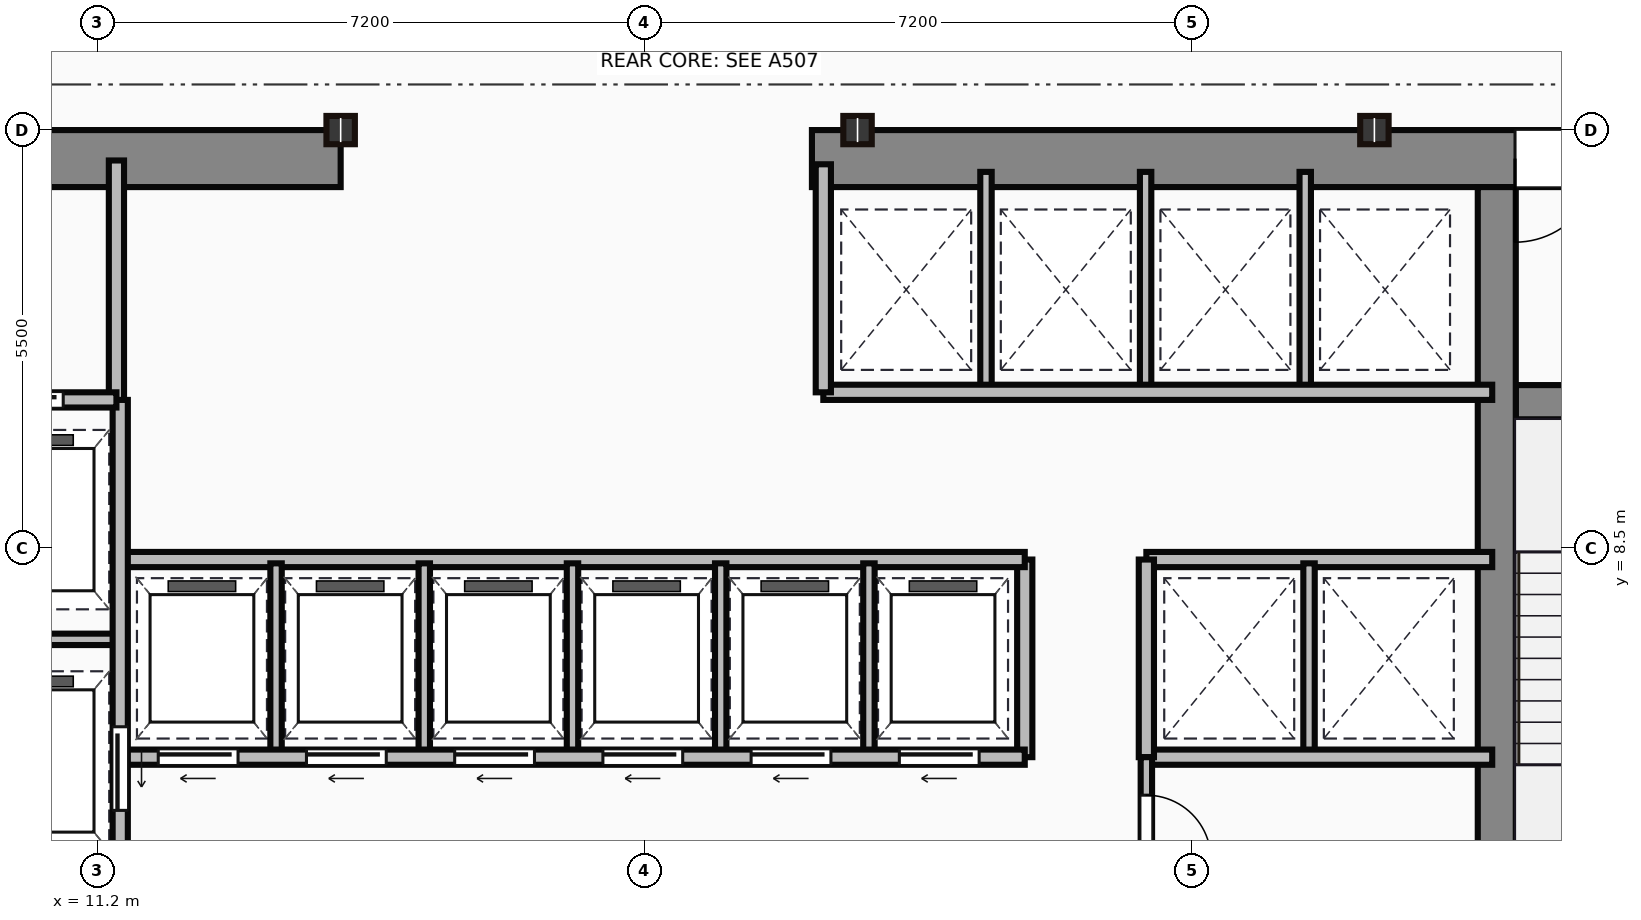
"""IFC4 building model, lengths in metres.
Left out: names, types, materials, properties, quantities, classifications, styles, units other than length and angle.
Written with IfcOpenShell. Run it as: python <this file> out.ifc"""

import sys

from ifc_helpers import new_model, si_unit, direction, frame, frame_2d, origin, origin_2d, place, context, subcontext, project, spatial, rectangle, i_section, extrude, source, transform, mapped, element, fill, save


model = new_model("IFC4")
c1 = context("Model", 3, precision=1e-05, world=origin(), true_north=direction((0.0, 1.0)))
c2 = subcontext(c1, "Body", "Model", "MODEL_VIEW")
j1 = project(units=[si_unit("LENGTHUNIT", "METRE"), si_unit("PLANEANGLEUNIT", "RADIAN")], contexts=[c1])
p1 = place(None, origin())
s1 = spatial("IfcSite", under=j1, at=p1, CompositionType="ELEMENT")
p2 = place(p1, origin())
s2 = spatial("IfcBuilding", under=s1, at=p2, CompositionType="ELEMENT")
p3 = place(p2, frame((0.0, 0.0, 151.55)))
s3 = spatial("IfcBuildingStorey", under=s2, at=p3, CompositionType="ELEMENT", Elevation=151.55)
m1 = source(origin(), c2, "Body", "SweptSolid", [
    extrude(rectangle(XDim=9.1, YDim=0.75, at=frame_2d((4.55, 0.0))), origin(), (0.0, 0.0, 1.0), 3.65),
])
p4 = place(p3, frame((5.3, 13.625, 0.0), z_axis=(0.0, 0.0, 1.0), x_axis=(1.0, 0.0, 0.0)))
e1 = element("IfcWall", 1, at=p4, inside=s3, PredefinedType="SHEAR", context=c2, shape_type="MappedRepresentation", body=[
    mapped(m1, transform((0.0, 0.0, 0.0))),
])
p5 = place(p4, frame((4.1, 0.0, 0.0)))
e2 = element("IfcOpeningElement", 2, at=p5, cuts=e1, PredefinedType="OPENING", context=c2, shape_type="SweptSolid", body=[
    extrude(rectangle(XDim=1.1, YDim=2.15, at=frame_2d((0.55, 1.075))), frame((0.0, 0.385, 0.0), z_axis=(0.0, -1.0, 0.0), x_axis=(1.0, 0.0, 0.0)), (0.0, 0.0, 1.0), 0.77),
])
m2 = source(origin(), c2, "Body", "SweptSolid", [
    extrude(rectangle(XDim=12.6, YDim=0.75, at=frame_2d((6.3, 0.0))), origin(), (0.0, 0.0, 1.0), 3.65),
])
p6 = place(p3, frame((20.6, 13.625, 0.0), z_axis=(0.0, 0.0, 1.0), x_axis=(1.0, 0.0, 0.0)))
e3 = element("IfcWall", 3, at=p6, inside=s3, PredefinedType="SHEAR", context=c2, shape_type="MappedRepresentation", body=[
    mapped(m2, transform((0.0, 0.0, 0.0))),
])
p7 = place(p6, frame((9.25, 0.0, 0.0)))
e4 = element("IfcOpeningElement", 4, at=p7, cuts=e3, PredefinedType="OPENING", context=c2, shape_type="SweptSolid", body=[
    extrude(rectangle(XDim=1.1, YDim=2.15, at=frame_2d((0.55, 1.075))), frame((0.0, 0.385, 0.0), z_axis=(0.0, -1.0, 0.0), x_axis=(1.0, 0.0, 0.0)), (0.0, 0.0, 1.0), 0.77),
])
m3 = source(origin(), c2, "Body", "SweptSolid", [
    extrude(rectangle(XDim=12.35, YDim=0.5, at=frame_2d((6.175, 0.0))), origin(), (0.0, 0.0, 1.0), 3.65),
])
p8 = place(p3, frame((29.61, 0.9, 0.0), z_axis=(0.0, 0.0, 1.0), x_axis=(0.0, 1.0, 0.0)))
e5 = element("IfcWall", 5, at=p8, inside=s3, PredefinedType="SHEAR", context=c2, shape_type="MappedRepresentation", body=[
    mapped(m3, transform((0.0, 0.0, 0.0))),
])
m4 = source(origin(), c2, "Body", "SweptSolid", [
    extrude(rectangle(XDim=3.39, YDim=0.45, at=frame_2d((1.695, 0.0))), origin(), (0.0, 0.0, 1.0), 3.65),
])
p9 = place(p3, frame((29.86, 10.42, 0.0), z_axis=(0.0, 0.0, 1.0), x_axis=(1.0, 0.0, 0.0)))
e6 = element("IfcWall", 6, at=p9, inside=s3, PredefinedType="SHEAR", context=c2, shape_type="MappedRepresentation", body=[
    mapped(m4, transform((0.0, 0.0, 0.0))),
])
p10 = place(p9, frame((1.1, 0.0, 0.0)))
e7 = element("IfcOpeningElement", 7, at=p10, cuts=e6, PredefinedType="OPENING", context=c2, shape_type="SweptSolid", body=[
    extrude(rectangle(XDim=1.1, YDim=2.15, at=frame_2d((0.55, 1.075))), frame((0.0, 0.235, 0.0), z_axis=(0.0, -1.0, 0.0), x_axis=(1.0, 0.0, 0.0)), (0.0, 0.0, 1.0), 0.47),
])
m5 = source(origin(), c2, "Body", "SweptSolid", [
    extrude(i_section(OverallWidth=0.374, OverallDepth=0.372, WebThickness=0.016, FlangeThickness=0.026, at=origin_2d()), origin(), (0.0, 0.0, 1.0), 3.65),
])
for number, where, z_axis, x_axis in (
    (8, (14.4, 14.0, 0.0), (0.0, 0.0, 1.0), (1.0, 0.0, 0.0)),
    (9, (21.2, 14.0, 0.0), (0.0, 0.0, 1.0), (1.0, 0.0, 0.0)),
    (10, (28.0, 14.0, 0.0), (0.0, 0.0, 1.0), (1.0, 0.0, 0.0)),
):
    element("IfcColumn", number, at=place(p3, frame(where, z_axis=z_axis, x_axis=x_axis)), inside=s3, PredefinedType="COLUMN", context=c2, shape_type="MappedRepresentation", body=[
        mapped(m5, transform((0.0, 0.0, 0.0))),
    ])
m6 = source(origin(), c2, "Body", "SweptSolid", [
    extrude(rectangle(XDim=3.18, YDim=0.2, at=frame_2d((1.59, 0.0))), origin(), (0.0, 0.0, 1.0), 3.4),
])
p11 = place(p3, frame((11.45, 10.42, 0.0), z_axis=(0.0, 0.0, 1.0), x_axis=(0.0, 1.0, 0.0)))
e11 = element("IfcWall", 11, at=p11, inside=s3, PredefinedType="PARTITIONING", context=c2, shape_type="MappedRepresentation", body=[
    mapped(m6, transform((0.0, 0.0, 0.0))),
])
m7 = source(origin(), c2, "Body", "SweptSolid", [
    extrude(rectangle(XDim=2.35, YDim=0.2, at=frame_2d((1.175, 0.0))), origin(), (0.0, 0.0, 1.0), 3.4),
])
p12 = place(p3, frame((9.1, 10.45, 0.0), z_axis=(0.0, 0.0, 1.0), x_axis=(1.0, 0.0, 0.0)))
e12 = element("IfcWall", 12, at=p12, inside=s3, PredefinedType="PARTITIONING", context=c2, shape_type="MappedRepresentation", body=[
    mapped(m7, transform((0.0, 0.0, 0.0))),
])
p13 = place(p12, frame((0.55, 0.0, 0.0)))
e13 = element("IfcOpeningElement", 13, at=p13, cuts=e12, PredefinedType="OPENING", context=c2, shape_type="SweptSolid", body=[
    extrude(rectangle(XDim=1.1, YDim=2.15, at=frame_2d((0.55, 1.075))), frame((0.0, 0.11, 0.0), z_axis=(0.0, -1.0, 0.0), x_axis=(1.0, 0.0, 0.0)), (0.0, 0.0, 1.0), 0.22),
])
m8 = source(origin(), c2, "Body", "SweptSolid", [
    extrude(rectangle(XDim=9.6, YDim=0.2, at=frame_2d((4.8, 0.0))), origin(), (0.0, 0.0, 1.0), 3.4),
])
p14 = place(p3, frame((11.5, 0.85, 0.0), z_axis=(0.0, 0.0, 1.0), x_axis=(0.0, 1.0, 0.0)))
e14 = element("IfcWall", 14, at=p14, inside=s3, PredefinedType="PARTITIONING", context=c2, shape_type="MappedRepresentation", body=[
    mapped(m8, transform((0.0, 0.0, 0.0))),
])
p15 = place(p14, frame((4.2, 0.0, 0.0)))
e15 = element("IfcOpeningElement", 15, at=p15, cuts=e14, PredefinedType="OPENING", context=c2, shape_type="SweptSolid", body=[
    extrude(rectangle(XDim=1.1, YDim=2.15, at=frame_2d((0.55, 1.075))), frame((0.0, 0.11, 0.0), z_axis=(0.0, -1.0, 0.0), x_axis=(1.0, 0.0, 0.0)), (0.0, 0.0, 1.0), 0.22),
])
p16 = place(p14, frame((0.9, 0.0, 0.0)))
e16 = element("IfcOpeningElement", 16, at=p16, cuts=e14, PredefinedType="OPENING", context=c2, shape_type="SweptSolid", body=[
    extrude(rectangle(XDim=1.2, YDim=2.15, at=frame_2d((0.6, 1.075))), frame((0.0, 0.11, 0.0), z_axis=(0.0, -1.0, 0.0), x_axis=(1.0, 0.0, 0.0)), (0.0, 0.0, 1.0), 0.22),
])
m9 = source(origin(), c2, "Body", "SweptSolid", [
    extrude(rectangle(XDim=2.4, YDim=0.15, at=frame_2d((1.2, 0.0))), origin(), (0.0, 0.0, 1.0), 3.4),
])
p17 = place(p3, frame((9.1, 7.3, 0.0), z_axis=(0.0, 0.0, 1.0), x_axis=(1.0, 0.0, 0.0)))
e17 = element("IfcWall", 17, at=p17, inside=s3, PredefinedType="PARTITIONING", context=c2, shape_type="MappedRepresentation", body=[
    mapped(m9, transform((0.0, 0.0, 0.0))),
])
m10 = source(origin(), c2, "Body", "SweptSolid", [
    extrude(rectangle(XDim=11.85, YDim=0.2, at=frame_2d((5.925, 0.0))), origin(), (0.0, 0.0, 1.0), 3.4),
])
p18 = place(p3, frame((11.55, 5.75, 0.0), z_axis=(0.0, 0.0, 1.0), x_axis=(1.0, 0.0, 0.0)))
e18 = element("IfcWall", 18, at=p18, inside=s3, PredefinedType="PARTITIONING", context=c2, shape_type="MappedRepresentation", body=[
    mapped(m10, transform((0.0, 0.0, 0.0))),
])
p19 = place(p18, frame((0.45, 0.0, 0.0)))
e19 = element("IfcOpeningElement", 19, at=p19, cuts=e18, PredefinedType="OPENING", context=c2, shape_type="SweptSolid", body=[
    extrude(rectangle(XDim=1.05, YDim=2.15, at=frame_2d((0.525, 1.075))), frame((0.0, 0.11, 0.0), z_axis=(0.0, -1.0, 0.0), x_axis=(1.0, 0.0, 0.0)), (0.0, 0.0, 1.0), 0.22),
])
p20 = place(p18, frame((2.4, 0.0, 0.0)))
e20 = element("IfcOpeningElement", 20, at=p20, cuts=e18, PredefinedType="OPENING", context=c2, shape_type="SweptSolid", body=[
    extrude(rectangle(XDim=1.05, YDim=2.15, at=frame_2d((0.525, 1.075))), frame((0.0, 0.11, 0.0), z_axis=(0.0, -1.0, 0.0), x_axis=(1.0, 0.0, 0.0)), (0.0, 0.0, 1.0), 0.22),
])
p21 = place(p18, frame((4.35, 0.0, 0.0)))
e21 = element("IfcOpeningElement", 21, at=p21, cuts=e18, PredefinedType="OPENING", context=c2, shape_type="SweptSolid", body=[
    extrude(rectangle(XDim=1.05, YDim=2.15, at=frame_2d((0.525, 1.075))), frame((0.0, 0.11, 0.0), z_axis=(0.0, -1.0, 0.0), x_axis=(1.0, 0.0, 0.0)), (0.0, 0.0, 1.0), 0.22),
])
p22 = place(p18, frame((6.3, 0.0, 0.0)))
e22 = element("IfcOpeningElement", 22, at=p22, cuts=e18, PredefinedType="OPENING", context=c2, shape_type="SweptSolid", body=[
    extrude(rectangle(XDim=1.05, YDim=2.15, at=frame_2d((0.525, 1.075))), frame((0.0, 0.11, 0.0), z_axis=(0.0, -1.0, 0.0), x_axis=(1.0, 0.0, 0.0)), (0.0, 0.0, 1.0), 0.22),
])
p23 = place(p18, frame((8.25, 0.0, 0.0)))
e23 = element("IfcOpeningElement", 23, at=p23, cuts=e18, PredefinedType="OPENING", context=c2, shape_type="SweptSolid", body=[
    extrude(rectangle(XDim=1.05, YDim=2.15, at=frame_2d((0.525, 1.075))), frame((0.0, 0.11, 0.0), z_axis=(0.0, -1.0, 0.0), x_axis=(1.0, 0.0, 0.0)), (0.0, 0.0, 1.0), 0.22),
])
p24 = place(p18, frame((10.2, 0.0, 0.0)))
e24 = element("IfcOpeningElement", 24, at=p24, cuts=e18, PredefinedType="OPENING", context=c2, shape_type="SweptSolid", body=[
    extrude(rectangle(XDim=1.05, YDim=2.15, at=frame_2d((0.525, 1.075))), frame((0.0, 0.11, 0.0), z_axis=(0.0, -1.0, 0.0), x_axis=(1.0, 0.0, 0.0)), (0.0, 0.0, 1.0), 0.22),
])
p25 = place(p3, frame((11.55, 8.35, 0.0), z_axis=(0.0, 0.0, 1.0), x_axis=(1.0, 0.0, 0.0)))
e25 = element("IfcWall", 25, at=p25, inside=s3, PredefinedType="PARTITIONING", context=c2, shape_type="MappedRepresentation", body=[
    mapped(m10, transform((0.0, 0.0, 0.0))),
])
m11 = source(origin(), c2, "Body", "SweptSolid", [
    extrude(rectangle(XDim=2.6, YDim=0.2, at=frame_2d((1.3, 0.0))), origin(), (0.0, 0.0, 1.0), 3.4),
])
p26 = place(p3, frame((23.4, 5.75, 0.0), z_axis=(0.0, 0.0, 1.0), x_axis=(0.0, 1.0, 0.0)))
e26 = element("IfcWall", 26, at=p26, inside=s3, PredefinedType="PARTITIONING", context=c2, shape_type="MappedRepresentation", body=[
    mapped(m11, transform((0.0, 0.0, 0.0))),
])
m12 = source(origin(), c2, "Body", "SweptSolid", [
    extrude(rectangle(XDim=2.5, YDim=0.15, at=frame_2d((1.25, 0.0))), origin(), (0.0, 0.0, 1.0), 3.4),
])
for number, where, z_axis, x_axis in (
    (27, (13.55, 5.8, 0.0), (0.0, 0.0, 1.0), (0.0, 1.0, 0.0)),
    (28, (15.5, 5.8, 0.0), (0.0, 0.0, 1.0), (0.0, 1.0, 0.0)),
    (29, (17.45, 5.8, 0.0), (0.0, 0.0, 1.0), (0.0, 1.0, 0.0)),
    (30, (19.4, 5.8, 0.0), (0.0, 0.0, 1.0), (0.0, 1.0, 0.0)),
    (31, (21.35, 5.8, 0.0), (0.0, 0.0, 1.0), (0.0, 1.0, 0.0)),
):
    element("IfcWall", number, at=place(p3, frame(where, z_axis=z_axis, x_axis=x_axis)), inside=s3, PredefinedType="PARTITIONING", context=c2, shape_type="MappedRepresentation", body=[
        mapped(m12, transform((0.0, 0.0, 0.0))),
    ])
m13 = source(origin(), c2, "Body", "SweptSolid", [
    extrude(rectangle(XDim=8.8, YDim=0.2, at=frame_2d((4.4, 0.0))), origin(), (0.0, 0.0, 1.0), 3.4),
])
p27 = place(p3, frame((20.75, 10.55, 0.0), z_axis=(0.0, 0.0, 1.0), x_axis=(1.0, 0.0, 0.0)))
e32 = element("IfcWall", 32, at=p27, inside=s3, PredefinedType="PARTITIONING", context=c2, shape_type="MappedRepresentation", body=[
    mapped(m13, transform((0.0, 0.0, 0.0))),
])
m14 = source(origin(), c2, "Body", "SweptSolid", [
    extrude(rectangle(XDim=3.0, YDim=0.2, at=frame_2d((1.5, 0.0))), origin(), (0.0, 0.0, 1.0), 3.4),
])
p28 = place(p3, frame((20.75, 10.55, 0.0), z_axis=(0.0, 0.0, 1.0), x_axis=(0.0, 1.0, 0.0)))
e33 = element("IfcWall", 33, at=p28, inside=s3, PredefinedType="PARTITIONING", context=c2, shape_type="MappedRepresentation", body=[
    mapped(m14, transform((0.0, 0.0, 0.0))),
])
m15 = source(origin(), c2, "Body", "SweptSolid", [
    extrude(rectangle(XDim=2.85, YDim=0.15, at=frame_2d((1.425, 0.0))), origin(), (0.0, 0.0, 1.0), 3.4),
])
for number, where, z_axis, x_axis in (
    (34, (22.89, 10.6, 0.0), (0.0, 0.0, 1.0), (0.0, 1.0, 0.0)),
    (35, (24.99, 10.6, 0.0), (0.0, 0.0, 1.0), (0.0, 1.0, 0.0)),
    (36, (27.09, 10.6, 0.0), (0.0, 0.0, 1.0), (0.0, 1.0, 0.0)),
):
    element("IfcWall", number, at=place(p3, frame(where, z_axis=z_axis, x_axis=x_axis)), inside=s3, PredefinedType="PARTITIONING", context=c2, shape_type="MappedRepresentation", body=[
        mapped(m15, transform((0.0, 0.0, 0.0))),
    ])
m16 = source(origin(), c2, "Body", "SweptSolid", [
    extrude(rectangle(XDim=4.55, YDim=0.2, at=frame_2d((2.275, 0.0))), origin(), (0.0, 0.0, 1.0), 3.4),
])
for number, where, z_axis, x_axis in (
    (37, (25.0, 8.35, 0.0), (0.0, 0.0, 1.0), (1.0, 0.0, 0.0)),
    (38, (25.0, 5.75, 0.0), (0.0, 0.0, 1.0), (1.0, 0.0, 0.0)),
):
    element("IfcWall", number, at=place(p3, frame(where, z_axis=z_axis, x_axis=x_axis)), inside=s3, PredefinedType="PARTITIONING", context=c2, shape_type="MappedRepresentation", body=[
        mapped(m16, transform((0.0, 0.0, 0.0))),
    ])
p29 = place(p3, frame((25.0, 5.75, 0.0), z_axis=(0.0, 0.0, 1.0), x_axis=(0.0, 1.0, 0.0)))
e39 = element("IfcWall", 39, at=p29, inside=s3, PredefinedType="PARTITIONING", context=c2, shape_type="MappedRepresentation", body=[
    mapped(m11, transform((0.0, 0.0, 0.0))),
])
p30 = place(p3, frame((27.14, 5.8, 0.0), z_axis=(0.0, 0.0, 1.0), x_axis=(0.0, 1.0, 0.0)))
e40 = element("IfcWall", 40, at=p30, inside=s3, PredefinedType="PARTITIONING", context=c2, shape_type="MappedRepresentation", body=[
    mapped(m12, transform((0.0, 0.0, 0.0))),
])
m17 = source(origin(), c2, "Body", "SweptSolid", [
    extrude(rectangle(XDim=4.9, YDim=0.15, at=frame_2d((2.45, 0.0))), origin(), (0.0, 0.0, 1.0), 3.4),
])
p31 = place(p3, frame((25.0, 0.85, 0.0), z_axis=(0.0, 0.0, 1.0), x_axis=(0.0, 1.0, 0.0)))
e41 = element("IfcWall", 41, at=p31, inside=s3, PredefinedType="PARTITIONING", context=c2, shape_type="MappedRepresentation", body=[
    mapped(m17, transform((0.0, 0.0, 0.0))),
])
p32 = place(p31, frame((1.85, 0.0, 0.0)))
e42 = element("IfcOpeningElement", 42, at=p32, cuts=e41, PredefinedType="OPENING", context=c2, shape_type="SweptSolid", body=[
    extrude(rectangle(XDim=0.95, YDim=2.15, at=frame_2d((0.475, 1.075))), frame((0.0, 0.085, 0.0), z_axis=(0.0, -1.0, 0.0), x_axis=(1.0, 0.0, 0.0)), (0.0, 0.0, 1.0), 0.17),
])
p33 = place(p31, frame((3.55, 0.0, 0.0)))
e43 = element("IfcOpeningElement", 43, at=p33, cuts=e41, PredefinedType="OPENING", context=c2, shape_type="SweptSolid", body=[
    extrude(rectangle(XDim=0.85, YDim=2.15, at=frame_2d((0.425, 1.075))), frame((0.0, 0.085, 0.0), z_axis=(0.0, -1.0, 0.0), x_axis=(1.0, 0.0, 0.0)), (0.0, 0.0, 1.0), 0.17),
])
m18 = source(origin(), c2, "Body", "SweptSolid", [
    extrude(rectangle(XDim=1.1, YDim=2.15, at=frame_2d((0.55, 1.075))), frame((0.0, 0.025, 0.0), z_axis=(0.0, -1.0, 0.0), x_axis=(1.0, 0.0, 0.0)), (0.0, 0.0, 1.0), 0.05),
])
p34 = place(p7, origin())
e44 = element("IfcDoor", 44, at=p34, inside=s3, OperationType="SINGLE_SWING_LEFT", PredefinedType="DOOR", context=c2, shape_type="MappedRepresentation", body=[
    mapped(m18, transform((0.0, 0.0, 0.0))),
])
fill(e4, e44)
p35 = place(p13, origin())
e45 = element("IfcDoor", 45, at=p35, inside=s3, OperationType="SLIDING_TO_LEFT", PredefinedType="DOOR", context=c2, shape_type="MappedRepresentation", body=[
    mapped(m18, transform((0.0, 0.0, 0.0))),
])
fill(e13, e45)
p36 = place(p15, frame((1.1, 0.0, 0.0), z_axis=(0.0, 0.0, 1.0), x_axis=(-1.0, 0.0, 0.0)))
e46 = element("IfcDoor", 46, at=p36, inside=s3, OperationType="SLIDING_TO_LEFT", PredefinedType="DOOR", context=c2, shape_type="MappedRepresentation", body=[
    mapped(m18, transform((0.0, 0.0, 0.0))),
])
fill(e15, e46)
m19 = source(origin(), c2, "Body", "SweptSolid", [
    extrude(rectangle(XDim=1.05, YDim=2.15, at=frame_2d((0.525, 1.075))), frame((0.0, 0.025, 0.0), z_axis=(0.0, -1.0, 0.0), x_axis=(1.0, 0.0, 0.0)), (0.0, 0.0, 1.0), 0.05),
])
p37 = place(p19, frame((1.05, 0.0, 0.0), z_axis=(0.0, 0.0, 1.0), x_axis=(-1.0, 0.0, 0.0)))
e47 = element("IfcDoor", 47, at=p37, inside=s3, OperationType="SLIDING_TO_LEFT", PredefinedType="DOOR", context=c2, shape_type="MappedRepresentation", body=[
    mapped(m19, transform((0.0, 0.0, 0.0))),
])
fill(e19, e47)
p38 = place(p20, frame((1.05, 0.0, 0.0), z_axis=(0.0, 0.0, 1.0), x_axis=(-1.0, 0.0, 0.0)))
e48 = element("IfcDoor", 48, at=p38, inside=s3, OperationType="SLIDING_TO_LEFT", PredefinedType="DOOR", context=c2, shape_type="MappedRepresentation", body=[
    mapped(m19, transform((0.0, 0.0, 0.0))),
])
fill(e20, e48)
p39 = place(p21, frame((1.05, 0.0, 0.0), z_axis=(0.0, 0.0, 1.0), x_axis=(-1.0, 0.0, 0.0)))
e49 = element("IfcDoor", 49, at=p39, inside=s3, OperationType="SLIDING_TO_LEFT", PredefinedType="DOOR", context=c2, shape_type="MappedRepresentation", body=[
    mapped(m19, transform((0.0, 0.0, 0.0))),
])
fill(e21, e49)
p40 = place(p22, frame((1.05, 0.0, 0.0), z_axis=(0.0, 0.0, 1.0), x_axis=(-1.0, 0.0, 0.0)))
e50 = element("IfcDoor", 50, at=p40, inside=s3, OperationType="SLIDING_TO_LEFT", PredefinedType="DOOR", context=c2, shape_type="MappedRepresentation", body=[
    mapped(m19, transform((0.0, 0.0, 0.0))),
])
fill(e22, e50)
p41 = place(p23, frame((1.05, 0.0, 0.0), z_axis=(0.0, 0.0, 1.0), x_axis=(-1.0, 0.0, 0.0)))
e51 = element("IfcDoor", 51, at=p41, inside=s3, OperationType="SLIDING_TO_LEFT", PredefinedType="DOOR", context=c2, shape_type="MappedRepresentation", body=[
    mapped(m19, transform((0.0, 0.0, 0.0))),
])
fill(e23, e51)
p42 = place(p24, frame((1.05, 0.0, 0.0), z_axis=(0.0, 0.0, 1.0), x_axis=(-1.0, 0.0, 0.0)))
e52 = element("IfcDoor", 52, at=p42, inside=s3, OperationType="SLIDING_TO_LEFT", PredefinedType="DOOR", context=c2, shape_type="MappedRepresentation", body=[
    mapped(m19, transform((0.0, 0.0, 0.0))),
])
fill(e24, e52)
m20 = source(origin(), c2, "Body", "SweptSolid", [
    extrude(rectangle(XDim=0.85, YDim=2.15, at=frame_2d((0.425, 1.075))), frame((0.0, 0.025, 0.0), z_axis=(0.0, -1.0, 0.0), x_axis=(1.0, 0.0, 0.0)), (0.0, 0.0, 1.0), 0.05),
])
p43 = place(p33, origin())
e53 = element("IfcDoor", 53, at=p43, inside=s3, OperationType="SINGLE_SWING_LEFT", PredefinedType="DOOR", context=c2, shape_type="MappedRepresentation", body=[
    mapped(m20, transform((0.0, 0.0, 0.0))),
])
fill(e43, e53)
save(model, sys.argv[1])
